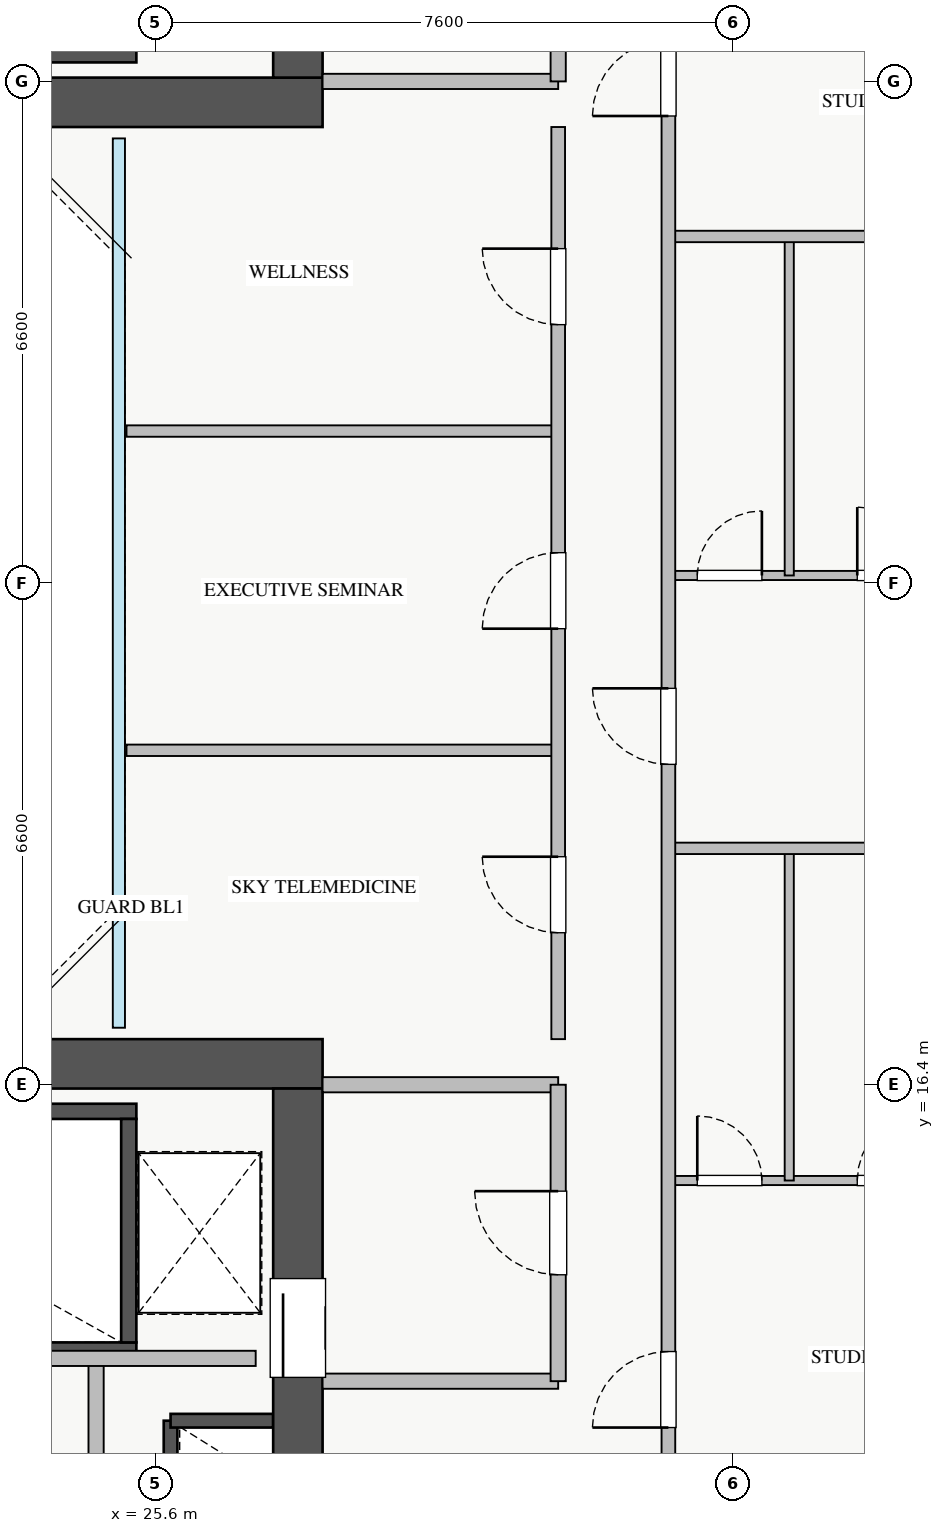
"""IFC4 building model, lengths in metres.
Left out: names, types, materials, properties, quantities, classifications, styles, units other than length and angle.
Written with IfcOpenShell. Run it as: python <this file> out.ifc"""

import sys

from ifc_helpers import new_model, si_unit, direction, frame, frame_2d, origin, place, context, subcontext, project, spatial, rectangle, extrude, source, transform, mapped, element, fill, save


model = new_model("IFC4")
c1 = context("Model", 3, precision=1e-05, world=origin(), true_north=direction((0.0, 1.0)))
c2 = subcontext(c1, "Body", "Model", "MODEL_VIEW")
j1 = project(units=[si_unit("LENGTHUNIT", "METRE"), si_unit("PLANEANGLEUNIT", "RADIAN")], contexts=[c1])
p1 = place(None, origin())
s1 = spatial("IfcSite", under=j1, at=p1, CompositionType="ELEMENT")
p2 = place(p1, origin())
s2 = spatial("IfcBuilding", under=s1, at=p2, CompositionType="ELEMENT")
p3 = place(p2, frame((0.0, 0.0, 179.5)))
s3 = spatial("IfcBuildingStorey", under=s2, at=p3, CompositionType="ELEMENT", Elevation=179.5)
p4 = place(p3, frame((25.8, 10.92, 0.0), z_axis=(0.0, 0.0, 1.0), x_axis=(0.0, 1.0, 0.0)))
e1 = element("IfcWall", 1, at=p4, inside=s3, PredefinedType="SHEAR", context=c2, shape_type="SweptSolid", body=[
    extrude(rectangle(XDim=1.06, YDim=0.18, at=frame_2d((0.53, 0.0))), origin(), (0.0, 0.0, 1.0), 3.07),
])
p5 = place(p3, frame((25.8, 11.98, 0.0), z_axis=(0.0, 0.0, 1.0), x_axis=(1.0, 0.0, 0.0)))
e2 = element("IfcWall", 2, at=p5, inside=s3, PredefinedType="SHEAR", context=c2, shape_type="SweptSolid", body=[
    extrude(rectangle(XDim=1.35, YDim=0.18, at=frame_2d((0.675, 0.0))), origin(), (0.0, 0.0, 1.0), 3.07),
])
p6 = place(p3, frame((18.2, 29.95, 0.0), z_axis=(0.0, 0.0, 1.0), x_axis=(1.0, 0.0, 0.0)))
e3 = element("IfcWall", 3, at=p6, inside=s3, PredefinedType="SHEAR", context=c2, shape_type="SweptSolid", body=[
    extrude(rectangle(XDim=7.15, YDim=0.2, at=frame_2d((3.575, 0.0))), origin(), (0.0, 0.0, 1.0), 3.25),
])
p7 = place(p3, frame((18.2, 12.91, 0.0), z_axis=(0.0, 0.0, 1.0), x_axis=(1.0, 0.0, 0.0)))
e4 = element("IfcWall", 4, at=p7, inside=s3, PredefinedType="SHEAR", context=c2, shape_type="SweptSolid", body=[
    extrude(rectangle(XDim=7.15, YDim=0.2, at=frame_2d((3.575, 0.0))), origin(), (0.0, 0.0, 1.0), 3.25),
])
p8 = place(p7, frame((0.35, 0.0, 0.0)))
e5 = element("IfcOpeningElement", 5, at=p8, cuts=e4, PredefinedType="OPENING", context=c2, shape_type="SweptSolid", body=[
    extrude(rectangle(XDim=1.1, YDim=2.05, at=frame_2d((0.55, 1.025))), frame((0.0, 0.11, 0.0), z_axis=(0.0, -1.0, 0.0), x_axis=(1.0, 0.0, 0.0)), (0.0, 0.0, 1.0), 0.22),
])
p9 = place(p3, frame((18.2, 16.05, 0.0), z_axis=(0.0, 0.0, 1.0), x_axis=(1.0, 0.0, 0.0)))
e6 = element("IfcWall", 6, at=p9, inside=s3, PredefinedType="SHEAR", context=c2, shape_type="SweptSolid", body=[
    extrude(rectangle(XDim=7.15, YDim=0.2, at=frame_2d((3.575, 0.0))), origin(), (0.0, 0.0, 1.0), 3.25),
])
p10 = place(p3, frame((25.25, 13.01, 0.0), z_axis=(0.0, 0.0, 1.0), x_axis=(0.0, 1.0, 0.0)))
e7 = element("IfcWall", 7, at=p10, inside=s3, PredefinedType="SHEAR", context=c2, shape_type="SweptSolid", body=[
    extrude(rectangle(XDim=2.94, YDim=0.2, at=frame_2d((1.47, 0.0))), origin(), (0.0, 0.0, 1.0), 3.25),
])
p11 = place(p3, frame((10.2, 29.325, 0.0), z_axis=(0.0, 0.0, 1.0), x_axis=(1.0, 0.0, 0.0)))
e8 = element("IfcWall", 8, at=p11, inside=s3, PredefinedType="SHEAR", context=c2, shape_type="SweptSolid", body=[
    extrude(rectangle(XDim=17.6, YDim=0.65, at=frame_2d((8.8, 0.0))), origin(), (0.0, 0.0, 1.0), 3.25),
])
p12 = place(p3, frame((27.475, 29.65, 0.0), z_axis=(0.0, 0.0, 1.0), x_axis=(0.0, 1.0, 0.0)))
e9 = element("IfcWall", 9, at=p12, inside=s3, PredefinedType="SHEAR", context=c2, shape_type="SweptSolid", body=[
    extrude(rectangle(XDim=5.9, YDim=0.65, at=frame_2d((2.95, 0.0))), origin(), (0.0, 0.0, 1.0), 3.25),
])
p13 = place(p12, frame((1.1, 0.0, 0.0)))
e10 = element("IfcOpeningElement", 10, at=p13, cuts=e9, PredefinedType="OPENING", context=c2, shape_type="SweptSolid", body=[
    extrude(rectangle(XDim=1.3, YDim=2.05, at=frame_2d((0.65, 1.025))), frame((0.0, 0.335, 0.0), z_axis=(0.0, -1.0, 0.0), x_axis=(1.0, 0.0, 0.0)), (0.0, 0.0, 1.0), 0.67),
])
p14 = place(p3, frame((10.2, 16.675, 0.0), z_axis=(0.0, 0.0, 1.0), x_axis=(1.0, 0.0, 0.0)))
e11 = element("IfcWall", 11, at=p14, inside=s3, PredefinedType="SHEAR", context=c2, shape_type="SweptSolid", body=[
    extrude(rectangle(XDim=17.6, YDim=0.65, at=frame_2d((8.8, 0.0))), origin(), (0.0, 0.0, 1.0), 3.25),
])
p15 = place(p3, frame((27.475, 10.45, 0.0), z_axis=(0.0, 0.0, 1.0), x_axis=(0.0, 1.0, 0.0)))
e12 = element("IfcWall", 12, at=p15, inside=s3, PredefinedType="SHEAR", context=c2, shape_type="SweptSolid", body=[
    extrude(rectangle(XDim=5.9, YDim=0.65, at=frame_2d((2.95, 0.0))), origin(), (0.0, 0.0, 1.0), 3.25),
])
p16 = place(p15, frame((2.1, 0.0, 0.0)))
e13 = element("IfcOpeningElement", 13, at=p16, cuts=e12, PredefinedType="OPENING", context=c2, shape_type="SweptSolid", body=[
    extrude(rectangle(XDim=1.3, YDim=2.05, at=frame_2d((0.65, 1.025))), frame((0.0, 0.335, 0.0), z_axis=(0.0, -1.0, 0.0), x_axis=(1.0, 0.0, 0.0)), (0.0, 0.0, 1.0), 0.67),
])
p17 = place(p3, frame((27.8, 29.6, 0.0), z_axis=(0.0, 0.0, 1.0), x_axis=(1.0, 0.0, 0.0)))
e14 = element("IfcWall", 14, at=p17, inside=s3, PredefinedType="PARTITIONING", context=c2, shape_type="SweptSolid", body=[
    extrude(rectangle(XDim=3.1, YDim=0.2, at=frame_2d((1.55, 0.0))), origin(), (0.0, 0.0, 1.0), 3.07),
])
p18 = place(p3, frame((30.9, 29.6, 0.0), z_axis=(0.0, 0.0, 1.0), x_axis=(0.0, 1.0, 0.0)))
e15 = element("IfcWall", 15, at=p18, inside=s3, PredefinedType="PARTITIONING", context=c2, shape_type="SweptSolid", body=[
    extrude(rectangle(XDim=3.9, YDim=0.2, at=frame_2d((1.95, 0.0))), origin(), (0.0, 0.0, 1.0), 3.07),
])
p19 = place(p18, frame((1.4, 0.0, 0.0)))
e16 = element("IfcOpeningElement", 16, at=p19, cuts=e15, PredefinedType="OPENING", context=c2, shape_type="SweptSolid", body=[
    extrude(rectangle(XDim=1.1, YDim=2.05, at=frame_2d((0.55, 1.025))), frame((0.0, 0.11, 0.0), z_axis=(0.0, -1.0, 0.0), x_axis=(1.0, 0.0, 0.0)), (0.0, 0.0, 1.0), 0.22),
])
for number, where, z_axis, x_axis in (
    (17, (27.8, 16.4, 0.0), (0.0, 0.0, 1.0), (1.0, 0.0, 0.0)),
    (18, (27.8, 12.5, 0.0), (0.0, 0.0, 1.0), (1.0, 0.0, 0.0)),
):
    element("IfcWall", number, at=place(p3, frame(where, z_axis=z_axis, x_axis=x_axis)), inside=s3, PredefinedType="PARTITIONING", context=c2, shape_type="SweptSolid", body=[
        extrude(rectangle(XDim=3.1, YDim=0.2, at=frame_2d((1.55, 0.0))), origin(), (0.0, 0.0, 1.0), 3.07),
    ])
p20 = place(p3, frame((30.9, 12.5, 0.0), z_axis=(0.0, 0.0, 1.0), x_axis=(0.0, 1.0, 0.0)))
e19 = element("IfcWall", 19, at=p20, inside=s3, PredefinedType="PARTITIONING", context=c2, shape_type="SweptSolid", body=[
    extrude(rectangle(XDim=3.9, YDim=0.2, at=frame_2d((1.95, 0.0))), origin(), (0.0, 0.0, 1.0), 3.07),
])
p21 = place(p20, frame((1.4, 0.0, 0.0)))
e20 = element("IfcOpeningElement", 20, at=p21, cuts=e19, PredefinedType="OPENING", context=c2, shape_type="SweptSolid", body=[
    extrude(rectangle(XDim=1.1, YDim=2.05, at=frame_2d((0.55, 1.025))), frame((0.0, 0.11, 0.0), z_axis=(0.0, -1.0, 0.0), x_axis=(1.0, 0.0, 0.0)), (0.0, 0.0, 1.0), 0.22),
])
p22 = place(p3, frame((24.82, 10.15, 0.0), z_axis=(0.0, 0.0, 1.0), x_axis=(0.0, 1.0, 0.0)))
e21 = element("IfcWall", 21, at=p22, inside=s3, PredefinedType="PARTITIONING", context=c2, shape_type="SweptSolid", body=[
    extrude(rectangle(XDim=2.65, YDim=0.2, at=frame_2d((1.325, 0.0))), origin(), (0.0, 0.0, 1.0), 3.07),
])
p23 = place(p3, frame((21.75, 12.8, 0.0), z_axis=(0.0, 0.0, 1.0), x_axis=(1.0, 0.0, 0.0)))
e22 = element("IfcWall", 22, at=p23, inside=s3, PredefinedType="PARTITIONING", context=c2, shape_type="SweptSolid", body=[
    extrude(rectangle(XDim=5.17, YDim=0.2, at=frame_2d((2.585, 0.0))), origin(), (0.0, 0.0, 1.0), 3.07),
])
p24 = place(p3, frame((32.35, 15.14, 0.0), z_axis=(0.0, 0.0, 1.0), x_axis=(1.0, 0.0, 0.0)))
e23 = element("IfcWall", 23, at=p24, inside=s3, PredefinedType="PLUMBINGWALL", context=c2, shape_type="SweptSolid", body=[
    extrude(rectangle(XDim=4.3, YDim=0.12, at=frame_2d((2.15, 0.0))), origin(), (0.0, 0.0, 1.0), 3.07),
])
p25 = place(p24, frame((0.38, 0.0, 0.0)))
e24 = element("IfcOpeningElement", 24, at=p25, cuts=e23, PredefinedType="OPENING", context=c2, shape_type="SweptSolid", body=[
    extrude(rectangle(XDim=0.85, YDim=2.05, at=frame_2d((0.425, 1.025))), frame((0.0, 0.07, 0.0), z_axis=(0.0, -1.0, 0.0), x_axis=(1.0, 0.0, 0.0)), (0.0, 0.0, 1.0), 0.14),
])
p26 = place(p24, frame((2.485, 0.0, 0.0)))
e25 = element("IfcOpeningElement", 25, at=p26, cuts=e23, PredefinedType="OPENING", context=c2, shape_type="SweptSolid", body=[
    extrude(rectangle(XDim=0.9, YDim=2.05, at=frame_2d((0.45, 1.025))), frame((0.0, 0.07, 0.0), z_axis=(0.0, -1.0, 0.0), x_axis=(1.0, 0.0, 0.0)), (0.0, 0.0, 1.0), 0.14),
])
p27 = place(p3, frame((33.94, 15.14, 0.0), z_axis=(0.0, 0.0, 1.0), x_axis=(0.0, 1.0, 0.0)))
e26 = element("IfcWall", 26, at=p27, inside=s3, PredefinedType="PLUMBINGWALL", context=c2, shape_type="SweptSolid", body=[
    extrude(rectangle(XDim=4.37, YDim=0.12, at=frame_2d((2.185, 0.0))), origin(), (0.0, 0.0, 1.0), 3.07),
])
p28 = place(p3, frame((32.35, 23.1, 0.0), z_axis=(0.0, 0.0, 1.0), x_axis=(1.0, 0.0, 0.0)))
e27 = element("IfcWall", 27, at=p28, inside=s3, PredefinedType="PLUMBINGWALL", context=c2, shape_type="SweptSolid", body=[
    extrude(rectangle(XDim=4.3, YDim=0.12, at=frame_2d((2.15, 0.0))), origin(), (0.0, 0.0, 1.0), 3.07),
])
p29 = place(p28, frame((0.38, 0.0, 0.0)))
e28 = element("IfcOpeningElement", 28, at=p29, cuts=e27, PredefinedType="OPENING", context=c2, shape_type="SweptSolid", body=[
    extrude(rectangle(XDim=0.85, YDim=2.05, at=frame_2d((0.425, 1.025))), frame((0.0, 0.07, 0.0), z_axis=(0.0, -1.0, 0.0), x_axis=(1.0, 0.0, 0.0)), (0.0, 0.0, 1.0), 0.14),
])
p30 = place(p28, frame((2.485, 0.0, 0.0)))
e29 = element("IfcOpeningElement", 29, at=p30, cuts=e27, PredefinedType="OPENING", context=c2, shape_type="SweptSolid", body=[
    extrude(rectangle(XDim=0.9, YDim=2.05, at=frame_2d((0.45, 1.025))), frame((0.0, 0.07, 0.0), z_axis=(0.0, -1.0, 0.0), x_axis=(1.0, 0.0, 0.0)), (0.0, 0.0, 1.0), 0.14),
])
p31 = place(p3, frame((33.94, 23.1, 0.0), z_axis=(0.0, 0.0, 1.0), x_axis=(0.0, 1.0, 0.0)))
e30 = element("IfcWall", 30, at=p31, inside=s3, PredefinedType="PLUMBINGWALL", context=c2, shape_type="SweptSolid", body=[
    extrude(rectangle(XDim=4.46, YDim=0.12, at=frame_2d((2.23, 0.0))), origin(), (0.0, 0.0, 1.0), 3.07),
])
for number, where, z_axis, x_axis in (
    (31, (32.35, 19.51, 0.0), (0.0, 0.0, 1.0), (1.0, 0.0, 0.0)),
    (32, (32.35, 27.56, 0.0), (0.0, 0.0, 1.0), (1.0, 0.0, 0.0)),
):
    element("IfcWall", number, at=place(p3, frame(where, z_axis=z_axis, x_axis=x_axis)), inside=s3, PredefinedType="PARTITIONING", context=c2, shape_type="SweptSolid", body=[
        extrude(rectangle(XDim=4.3, YDim=0.15, at=frame_2d((2.15, 0.0))), origin(), (0.0, 0.0, 1.0), 3.07),
    ])
p32 = place(p3, frame((32.35, 8.31, 0.0), z_axis=(0.0, 0.0, 1.0), x_axis=(0.0, 1.0, 0.0)))
e33 = element("IfcWall", 33, at=p32, inside=s3, PredefinedType="PARTITIONING", context=c2, shape_type="SweptSolid", body=[
    extrude(rectangle(XDim=29.37, YDim=0.18, at=frame_2d((14.685, 0.0))), origin(), (0.0, 0.0, 1.0), 3.07),
])
p33 = place(p32, frame((28.06, 0.0, 0.0)))
e34 = element("IfcOpeningElement", 34, at=p33, cuts=e33, PredefinedType="OPENING", context=c2, shape_type="SweptSolid", body=[
    extrude(rectangle(XDim=0.9, YDim=2.05, at=frame_2d((0.45, 1.025))), frame((0.0, 0.1, 0.0), z_axis=(0.0, -1.0, 0.0), x_axis=(1.0, 0.0, 0.0)), (0.0, 0.0, 1.0), 0.2),
])
p34 = place(p32, frame((0.415, 0.0, 0.0)))
e35 = element("IfcOpeningElement", 35, at=p34, cuts=e33, PredefinedType="OPENING", context=c2, shape_type="SweptSolid", body=[
    extrude(rectangle(XDim=0.9, YDim=2.05, at=frame_2d((0.45, 1.025))), frame((0.0, 0.1, 0.0), z_axis=(0.0, -1.0, 0.0), x_axis=(1.0, 0.0, 0.0)), (0.0, 0.0, 1.0), 0.2),
])
p35 = place(p32, frame((3.58, 0.0, 0.0)))
e36 = element("IfcOpeningElement", 36, at=p35, cuts=e33, PredefinedType="OPENING", context=c2, shape_type="SweptSolid", body=[
    extrude(rectangle(XDim=1.0, YDim=2.05, at=frame_2d((0.5, 1.025))), frame((0.0, 0.1, 0.0), z_axis=(0.0, -1.0, 0.0), x_axis=(1.0, 0.0, 0.0)), (0.0, 0.0, 1.0), 0.2),
])
p36 = place(p32, frame((12.305, 0.0, 0.0)))
e37 = element("IfcOpeningElement", 37, at=p36, cuts=e33, PredefinedType="OPENING", context=c2, shape_type="SweptSolid", body=[
    extrude(rectangle(XDim=1.0, YDim=2.05, at=frame_2d((0.5, 1.025))), frame((0.0, 0.1, 0.0), z_axis=(0.0, -1.0, 0.0), x_axis=(1.0, 0.0, 0.0)), (0.0, 0.0, 1.0), 0.2),
])
p37 = place(p32, frame((20.835, 0.0, 0.0)))
e38 = element("IfcOpeningElement", 38, at=p37, cuts=e33, PredefinedType="OPENING", context=c2, shape_type="SweptSolid", body=[
    extrude(rectangle(XDim=1.0, YDim=2.05, at=frame_2d((0.5, 1.025))), frame((0.0, 0.1, 0.0), z_axis=(0.0, -1.0, 0.0), x_axis=(1.0, 0.0, 0.0)), (0.0, 0.0, 1.0), 0.2),
])
for number, where, z_axis, x_axis in (
    (39, (25.22, 20.8, 0.0), (0.0, 0.0, 1.0), (1.0, 0.0, 0.0)),
    (40, (25.22, 25.0, 0.0), (0.0, 0.0, 1.0), (1.0, 0.0, 0.0)),
):
    element("IfcWall", number, at=place(p3, frame(where, z_axis=z_axis, x_axis=x_axis)), inside=s3, PredefinedType="PARTITIONING", context=c2, shape_type="SweptSolid", body=[
        extrude(rectangle(XDim=5.68, YDim=0.15, at=frame_2d((2.84, 0.0))), origin(), (0.0, 0.0, 1.0), 3.07),
    ])
p38 = place(p3, frame((30.9, 17.0, 0.0), z_axis=(0.0, 0.0, 1.0), x_axis=(0.0, 1.0, 0.0)))
e41 = element("IfcWall", 41, at=p38, inside=s3, PredefinedType="PARTITIONING", context=c2, shape_type="SweptSolid", body=[
    extrude(rectangle(XDim=12.0, YDim=0.18, at=frame_2d((6.0, 0.0))), origin(), (0.0, 0.0, 1.0), 3.07),
])
p39 = place(p38, frame((1.4, 0.0, 0.0)))
e42 = element("IfcOpeningElement", 42, at=p39, cuts=e41, PredefinedType="OPENING", context=c2, shape_type="SweptSolid", body=[
    extrude(rectangle(XDim=1.0, YDim=2.05, at=frame_2d((0.5, 1.025))), frame((0.0, 0.1, 0.0), z_axis=(0.0, -1.0, 0.0), x_axis=(1.0, 0.0, 0.0)), (0.0, 0.0, 1.0), 0.2),
])
p40 = place(p38, frame((5.4, 0.0, 0.0)))
e43 = element("IfcOpeningElement", 43, at=p40, cuts=e41, PredefinedType="OPENING", context=c2, shape_type="SweptSolid", body=[
    extrude(rectangle(XDim=1.0, YDim=2.05, at=frame_2d((0.5, 1.025))), frame((0.0, 0.1, 0.0), z_axis=(0.0, -1.0, 0.0), x_axis=(1.0, 0.0, 0.0)), (0.0, 0.0, 1.0), 0.2),
])
p41 = place(p38, frame((9.4, 0.0, 0.0)))
e44 = element("IfcOpeningElement", 44, at=p41, cuts=e41, PredefinedType="OPENING", context=c2, shape_type="SweptSolid", body=[
    extrude(rectangle(XDim=1.0, YDim=2.05, at=frame_2d((0.5, 1.025))), frame((0.0, 0.1, 0.0), z_axis=(0.0, -1.0, 0.0), x_axis=(1.0, 0.0, 0.0)), (0.0, 0.0, 1.0), 0.2),
])
m1 = source(origin(), c2, "Body", "SweptSolid", [
    extrude(rectangle(XDim=1.3, YDim=2.05, at=frame_2d((0.65, 1.025))), frame((0.0, 0.025, 0.0), z_axis=(0.0, -1.0, 0.0), x_axis=(1.0, 0.0, 0.0)), (0.0, 0.0, 1.0), 0.05),
])
p42 = place(p16, origin())
e45 = element("IfcDoor", 45, at=p42, inside=s3, OperationType="SLIDING_TO_RIGHT", PredefinedType="DOOR", context=c2, shape_type="MappedRepresentation", body=[
    mapped(m1, transform((0.0, 0.0, 0.0), x_axis=(1.0, 0.0, 0.0), y_axis=(0.0, 1.0, 0.0), z_axis=(0.0, 0.0, 1.0), scale=1.0)),
])
fill(e13, e45)
m2 = source(origin(), c2, "Body", "SweptSolid", [
    extrude(rectangle(XDim=1.1, YDim=2.05, at=frame_2d((0.55, 1.025))), frame((0.0, 0.025, 0.0), z_axis=(0.0, -1.0, 0.0), x_axis=(1.0, 0.0, 0.0)), (0.0, 0.0, 1.0), 0.05),
])
p43 = place(p21, origin())
e46 = element("IfcDoor", 46, at=p43, inside=s3, OperationType="SINGLE_SWING_RIGHT", PredefinedType="DOOR", context=c2, shape_type="MappedRepresentation", body=[
    mapped(m2, transform((0.0, 0.0, 0.0), x_axis=(1.0, 0.0, 0.0), y_axis=(0.0, 1.0, 0.0), z_axis=(0.0, 0.0, 1.0), scale=1.0)),
])
fill(e20, e46)
m3 = source(origin(), c2, "Body", "SweptSolid", [
    extrude(rectangle(XDim=0.85, YDim=2.05, at=frame_2d((0.425, 1.025))), frame((0.0, 0.025, 0.0), z_axis=(0.0, -1.0, 0.0), x_axis=(1.0, 0.0, 0.0)), (0.0, 0.0, 1.0), 0.05),
])
p44 = place(p25, origin())
e47 = element("IfcDoor", 47, at=p44, inside=s3, OperationType="SINGLE_SWING_LEFT", PredefinedType="DOOR", context=c2, shape_type="MappedRepresentation", body=[
    mapped(m3, transform((0.0, 0.0, 0.0), x_axis=(1.0, 0.0, 0.0), y_axis=(0.0, 1.0, 0.0), z_axis=(0.0, 0.0, 1.0), scale=1.0)),
])
fill(e24, e47)
m4 = source(origin(), c2, "Body", "SweptSolid", [
    extrude(rectangle(XDim=0.9, YDim=2.05, at=frame_2d((0.45, 1.025))), frame((0.0, 0.025, 0.0), z_axis=(0.0, -1.0, 0.0), x_axis=(1.0, 0.0, 0.0)), (0.0, 0.0, 1.0), 0.05),
])
p45 = place(p26, origin())
e48 = element("IfcDoor", 48, at=p45, inside=s3, OperationType="SINGLE_SWING_RIGHT", PredefinedType="DOOR", context=c2, shape_type="MappedRepresentation", body=[
    mapped(m4, transform((0.0, 0.0, 0.0), x_axis=(1.0, 0.0, 0.0), y_axis=(0.0, 1.0, 0.0), z_axis=(0.0, 0.0, 1.0), scale=1.0)),
])
fill(e25, e48)
p46 = place(p29, origin())
e49 = element("IfcDoor", 49, at=p46, inside=s3, OperationType="SINGLE_SWING_RIGHT", PredefinedType="DOOR", context=c2, shape_type="MappedRepresentation", body=[
    mapped(m3, transform((0.0, 0.0, 0.0), x_axis=(1.0, 0.0, 0.0), y_axis=(0.0, 1.0, 0.0), z_axis=(0.0, 0.0, 1.0), scale=1.0)),
])
fill(e28, e49)
p47 = place(p30, origin())
e50 = element("IfcDoor", 50, at=p47, inside=s3, OperationType="SINGLE_SWING_LEFT", PredefinedType="DOOR", context=c2, shape_type="MappedRepresentation", body=[
    mapped(m4, transform((0.0, 0.0, 0.0), x_axis=(1.0, 0.0, 0.0), y_axis=(0.0, 1.0, 0.0), z_axis=(0.0, 0.0, 1.0), scale=1.0)),
])
fill(e29, e50)
m5 = source(origin(), c2, "Body", "SweptSolid", [
    extrude(rectangle(XDim=1.0, YDim=2.05, at=frame_2d((0.5, 1.025))), frame((0.0, 0.025, 0.0), z_axis=(0.0, -1.0, 0.0), x_axis=(1.0, 0.0, 0.0)), (0.0, 0.0, 1.0), 0.05),
])
p48 = place(p35, origin())
e51 = element("IfcDoor", 51, at=p48, inside=s3, OperationType="SINGLE_SWING_LEFT", PredefinedType="DOOR", context=c2, shape_type="MappedRepresentation", body=[
    mapped(m5, transform((0.0, 0.0, 0.0), x_axis=(1.0, 0.0, 0.0), y_axis=(0.0, 1.0, 0.0), z_axis=(0.0, 0.0, 1.0), scale=1.0)),
])
fill(e36, e51)
p49 = place(p36, origin())
e52 = element("IfcDoor", 52, at=p49, inside=s3, OperationType="SINGLE_SWING_RIGHT", PredefinedType="DOOR", context=c2, shape_type="MappedRepresentation", body=[
    mapped(m5, transform((0.0, 0.0, 0.0), x_axis=(1.0, 0.0, 0.0), y_axis=(0.0, 1.0, 0.0), z_axis=(0.0, 0.0, 1.0), scale=1.0)),
])
fill(e37, e52)
p50 = place(p37, origin())
e53 = element("IfcDoor", 53, at=p50, inside=s3, OperationType="SINGLE_SWING_LEFT", PredefinedType="DOOR", context=c2, shape_type="MappedRepresentation", body=[
    mapped(m5, transform((0.0, 0.0, 0.0), x_axis=(1.0, 0.0, 0.0), y_axis=(0.0, 1.0, 0.0), z_axis=(0.0, 0.0, 1.0), scale=1.0)),
])
fill(e38, e53)
p51 = place(p39, origin())
e54 = element("IfcDoor", 54, at=p51, inside=s3, OperationType="SINGLE_SWING_RIGHT", PredefinedType="DOOR", context=c2, shape_type="MappedRepresentation", body=[
    mapped(m5, transform((0.0, 0.0, 0.0), x_axis=(1.0, 0.0, 0.0), y_axis=(0.0, 1.0, 0.0), z_axis=(0.0, 0.0, 1.0), scale=1.0)),
])
fill(e42, e54)
p52 = place(p40, origin())
e55 = element("IfcDoor", 55, at=p52, inside=s3, OperationType="SINGLE_SWING_LEFT", PredefinedType="DOOR", context=c2, shape_type="MappedRepresentation", body=[
    mapped(m5, transform((0.0, 0.0, 0.0), x_axis=(1.0, 0.0, 0.0), y_axis=(0.0, 1.0, 0.0), z_axis=(0.0, 0.0, 1.0), scale=1.0)),
])
fill(e43, e55)
p53 = place(p41, origin())
e56 = element("IfcDoor", 56, at=p53, inside=s3, OperationType="SINGLE_SWING_RIGHT", PredefinedType="DOOR", context=c2, shape_type="MappedRepresentation", body=[
    mapped(m5, transform((0.0, 0.0, 0.0), x_axis=(1.0, 0.0, 0.0), y_axis=(0.0, 1.0, 0.0), z_axis=(0.0, 0.0, 1.0), scale=1.0)),
])
fill(e44, e56)
save(model, sys.argv[1])
